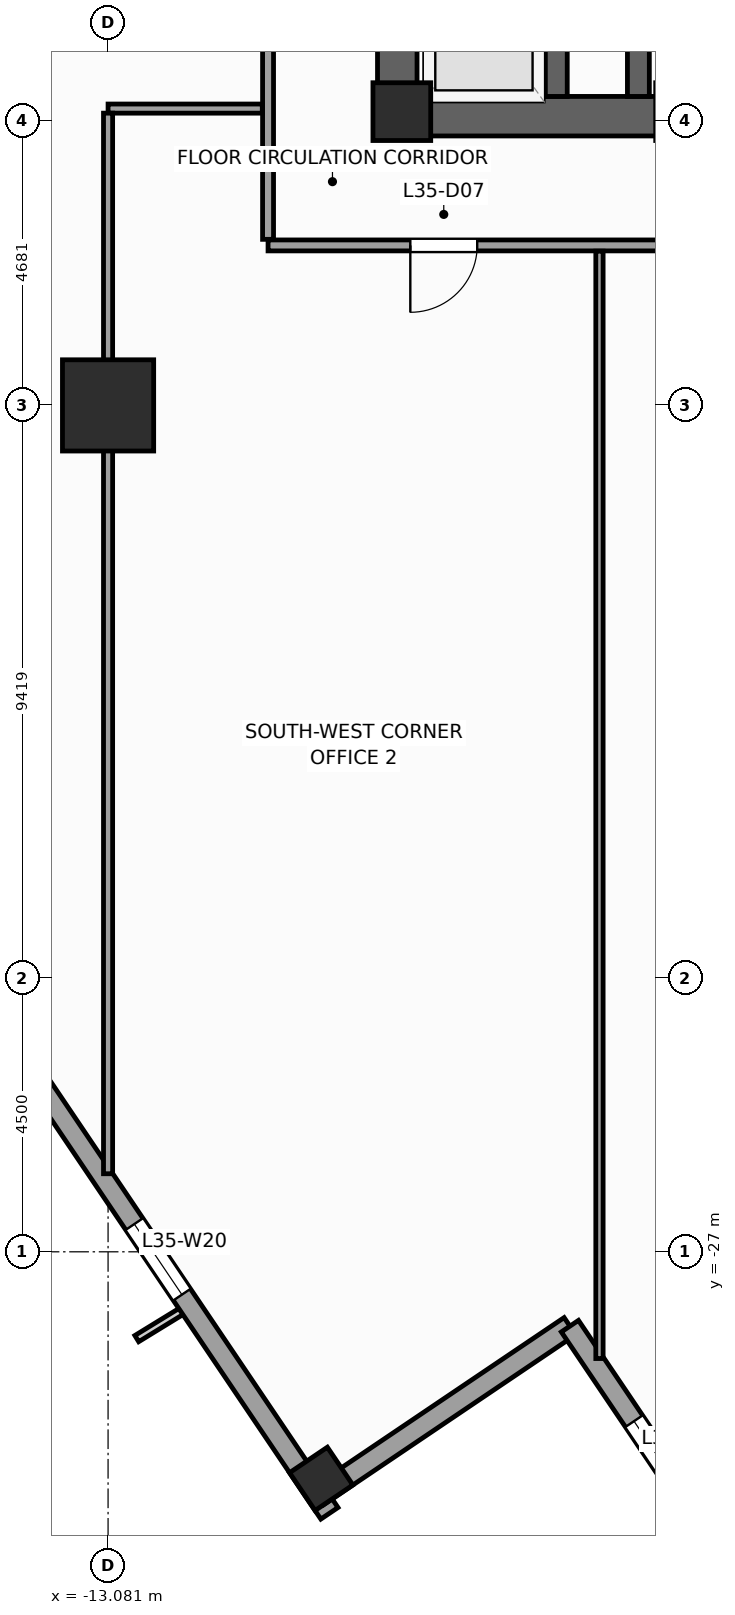
"""IFC4 building model, lengths in metres.
Left out: names, types, materials, properties, quantities, classifications, styles, units other than length and angle.
Written with IfcOpenShell. Run it as: python <this file> out.ifc"""

import sys

from ifc_helpers import new_model, si_unit, direction, frame, frame_2d, origin, origin_2d, place, context, subcontext, project, spatial, rectangle, extrude, source, transform, mapped, element, fill, save


model = new_model("IFC4")
c1 = context("Model", 3, precision=1e-05, world=origin(), true_north=direction((0.0, 1.0)))
c2 = subcontext(c1, "Body", "Model", "MODEL_VIEW")
j1 = project(units=[si_unit("LENGTHUNIT", "METRE"), si_unit("PLANEANGLEUNIT", "RADIAN")], contexts=[c1])
p1 = place(None, origin())
s1 = spatial("IfcSite", under=j1, at=p1, CompositionType="ELEMENT")
p2 = place(p1, origin())
s2 = spatial("IfcBuilding", under=s1, at=p2, CompositionType="ELEMENT")
p3 = place(p2, frame((0.0, 0.0, 148.4)))
s3 = spatial("IfcBuildingStorey", under=s2, at=p3, CompositionType="ELEMENT", Elevation=148.4)
p4 = place(p3, frame((-8.65, -8.325, 0.0), z_axis=(0.0, 0.0, 1.0), x_axis=(1.0, 0.0, 0.0)))
e1 = element("IfcWall", 1, at=p4, inside=s3, PredefinedType="SHEAR", context=c2, shape_type="SweptSolid", body=[
    extrude(rectangle(XDim=17.3, YDim=0.65, at=frame_2d((8.65, 0.0))), origin(), (0.0, 0.0, 1.0), 4.0),
])
p5 = place(p4, frame((8.0, 0.0, 0.0)))
e2 = element("IfcOpeningElement", 2, at=p5, cuts=e1, PredefinedType="OPENING", context=c2, shape_type="SweptSolid", body=[
    extrude(rectangle(XDim=1.3, YDim=2.2, at=frame_2d((0.65, 1.1))), frame((0.0, 0.335, 0.0), z_axis=(0.0, -1.0, 0.0), x_axis=(1.0, 0.0, 0.0)), (0.0, 0.0, 1.0), 0.67),
])
p6 = place(p3, frame((-8.325, -8.0, 0.0), z_axis=(0.0, 0.0, 1.0), x_axis=(0.0, 1.0, 0.0)))
e3 = element("IfcWall", 3, at=p6, inside=s3, PredefinedType="SHEAR", context=c2, shape_type="SweptSolid", body=[
    extrude(rectangle(XDim=16.0, YDim=0.65, at=frame_2d((8.0, 0.0))), origin(), (0.0, 0.0, 1.0), 4.0),
])
p7 = place(p6, frame((4.69, 0.0, 0.0)))
e4 = element("IfcOpeningElement", 4, at=p7, cuts=e3, PredefinedType="OPENING", context=c2, shape_type="SweptSolid", body=[
    extrude(rectangle(XDim=1.3, YDim=2.2, at=frame_2d((0.65, 1.1))), frame((0.0, 0.335, 0.0), z_axis=(0.0, -1.0, 0.0), x_axis=(1.0, 0.0, 0.0)), (0.0, 0.0, 1.0), 0.67),
])
p8 = place(p3, frame((-4.36, -8.0, 0.0), z_axis=(0.0, 0.0, 1.0), x_axis=(0.0, 1.0, 0.0)))
e5 = element("IfcWall", 5, at=p8, inside=s3, PredefinedType="SHEAR", context=c2, shape_type="SweptSolid", body=[
    extrude(rectangle(XDim=16.0, YDim=0.36, at=frame_2d((8.0, 0.0))), origin(), (0.0, 0.0, 1.0), 4.0),
])
p9 = place(p3, frame((-5.71, -8.0, 0.0), z_axis=(0.0, 0.0, 1.0), x_axis=(0.0, 1.0, 0.0)))
e6 = element("IfcWall", 6, at=p9, inside=s3, PredefinedType="SHEAR", context=c2, shape_type="SweptSolid", body=[
    extrude(rectangle(XDim=2.54, YDim=0.36, at=frame_2d((1.27, 0.0))), origin(), (0.0, 0.0, 1.0), 4.0),
])
m1 = source(origin(), c2, "Body", "SweptSolid", [
    extrude(rectangle(XDim=0.95, YDim=0.95, at=origin_2d()), origin(), (0.0, 0.0, 1.0), 4.0),
])
p10 = place(p3, frame((-8.25, -8.25, 0.0), z_axis=(0.0, 0.0, 1.0), x_axis=(1.0, 0.0, 0.0)))
e7 = element("IfcColumn", 7, at=p10, inside=s3, PredefinedType="PILASTER", context=c2, shape_type="MappedRepresentation", body=[
    mapped(m1, transform((0.0, 0.0, 0.0), scale=1.0)),
])
m2 = source(origin(), c2, "Body", "SweptSolid", [
    extrude(rectangle(XDim=1.5, YDim=1.5, at=origin_2d()), origin(), (0.0, 0.0, 1.0), 4.0),
])
p11 = place(p3, frame((-13.081, -13.081, 0.0), z_axis=(0.0, 0.0, 1.0), x_axis=(1.0, 0.0, 0.0)))
e8 = element("IfcColumn", 8, at=p11, inside=s3, PredefinedType="COLUMN", context=c2, shape_type="MappedRepresentation", body=[
    mapped(m2, transform((0.0, 0.0, 0.0), scale=1.0)),
])
m3 = source(origin(), c2, "Body", "SweptSolid", [
    extrude(rectangle(XDim=0.75, YDim=0.75, at=origin_2d()), origin(), (0.0, 0.0, 1.0), 4.0),
])
p12 = place(p3, frame((-9.576, -30.734, 0.0), z_axis=(0.0, 0.0, 1.0), x_axis=(0.829037572555, 0.559192903471, 0.0)))
e9 = element("IfcColumn", 9, at=p12, inside=s3, PredefinedType="COLUMN", context=c2, shape_type="MappedRepresentation", body=[
    mapped(m3, transform((0.0, 0.0, 0.0), scale=1.0)),
])
p13 = place(p3, frame((-32.558, 2.972, 0.0), z_axis=(0.0, 0.0, 1.0), x_axis=(0.559194910251, -0.829036218961, 0.0)))
e10 = element("IfcWall", 10, at=p13, inside=s3, PredefinedType="STANDARD", context=c2, shape_type="SweptSolid", body=[
    extrude(rectangle(XDim=41.34, YDim=0.34, at=frame_2d((20.67, 0.0))), origin(), (0.0, 0.0, 1.0), 3.04),
])
p14 = place(p13, frame((3.511, 0.0, 0.56)))
e11 = element("IfcOpeningElement", 11, at=p14, cuts=e10, PredefinedType="OPENING", context=c2, shape_type="SweptSolid", body=[
    extrude(rectangle(XDim=1.4, YDim=2.4, at=frame_2d((0.7, 1.2))), frame((0.0, 0.18, 0.0), z_axis=(0.0, -1.0, 0.0), x_axis=(1.0, 0.0, 0.0)), (0.0, 0.0, 1.0), 0.36),
])
p15 = place(p13, frame((11.064, 0.0, 0.61)))
e12 = element("IfcOpeningElement", 12, at=p15, cuts=e10, PredefinedType="OPENING", context=c2, shape_type="SweptSolid", body=[
    extrude(rectangle(XDim=1.85, YDim=2.35, at=frame_2d((0.925, 1.175))), frame((0.0, 0.18, 0.0), z_axis=(0.0, -1.0, 0.0), x_axis=(1.0, 0.0, 0.0)), (0.0, 0.0, 1.0), 0.36),
])
p16 = place(p13, frame((18.168, 0.0, 0.61)))
e13 = element("IfcOpeningElement", 13, at=p16, cuts=e10, PredefinedType="OPENING", context=c2, shape_type="SweptSolid", body=[
    extrude(rectangle(XDim=1.85, YDim=2.35, at=frame_2d((0.925, 1.175))), frame((0.0, 0.18, 0.0), z_axis=(0.0, -1.0, 0.0), x_axis=(1.0, 0.0, 0.0)), (0.0, 0.0, 1.0), 0.36),
])
p17 = place(p13, frame((27.186, 0.0, 0.61)))
e14 = element("IfcOpeningElement", 14, at=p17, cuts=e10, PredefinedType="OPENING", context=c2, shape_type="SweptSolid", body=[
    extrude(rectangle(XDim=1.85, YDim=2.35, at=frame_2d((0.925, 1.175))), frame((0.0, 0.18, 0.0), z_axis=(0.0, -1.0, 0.0), x_axis=(1.0, 0.0, 0.0)), (0.0, 0.0, 1.0), 0.36),
])
p18 = place(p13, frame((35.602, 0.0, 0.56)))
e15 = element("IfcOpeningElement", 15, at=p18, cuts=e10, PredefinedType="OPENING", context=c2, shape_type="SweptSolid", body=[
    extrude(rectangle(XDim=1.4, YDim=2.4, at=frame_2d((0.7, 1.2))), frame((0.0, 0.18, 0.0), z_axis=(0.0, -1.0, 0.0), x_axis=(1.0, 0.0, 0.0)), (0.0, 0.0, 1.0), 0.36),
])
p19 = place(p3, frame((-9.631, -31.019, 0.0), z_axis=(0.0, 0.0, 1.0), x_axis=(0.829025804298, 0.559210350234, 0.0)))
e16 = element("IfcWall", 16, at=p19, inside=s3, PredefinedType="STANDARD", context=c2, shape_type="SweptSolid", body=[
    extrude(rectangle(XDim=5.0, YDim=0.34, at=frame_2d((2.5, 0.0))), origin(), (0.0, 0.0, 1.0), 3.74),
])
p20 = place(p3, frame((-5.486, -28.223, 0.0), z_axis=(0.0, 0.0, 1.0), x_axis=(0.559171107879, -0.82905227345, 0.0)))
e17 = element("IfcWall", 17, at=p20, inside=s3, PredefinedType="STANDARD", context=c2, shape_type="SweptSolid", body=[
    extrude(rectangle(XDim=5.17, YDim=0.34, at=frame_2d((2.585, 0.0))), origin(), (0.0, 0.0, 1.0), 3.04),
])
p21 = place(p20, frame((1.885, 0.0, 0.56)))
e18 = element("IfcOpeningElement", 18, at=p21, cuts=e17, PredefinedType="OPENING", context=c2, shape_type="SweptSolid", body=[
    extrude(rectangle(XDim=1.4, YDim=2.4, at=frame_2d((0.7, 1.2))), frame((0.0, 0.18, 0.0), z_axis=(0.0, -1.0, 0.0), x_axis=(1.0, 0.0, 0.0)), (0.0, 0.0, 1.0), 0.36),
])
p22 = place(p3, frame((-10.45, -10.45, 0.0), z_axis=(0.0, 0.0, 1.0), x_axis=(1.0, 0.0, 0.0)))
e19 = element("IfcWall", 19, at=p22, inside=s3, PredefinedType="PARTITIONING", context=c2, shape_type="SweptSolid", body=[
    extrude(rectangle(XDim=20.9, YDim=0.18, at=frame_2d((10.45, 0.0))), origin(), (0.0, 0.0, 1.0), 3.74),
])
p23 = place(p22, frame((2.339, 0.0, 0.0)))
e20 = element("IfcOpeningElement", 20, at=p23, cuts=e19, PredefinedType="OPENING", context=c2, shape_type="SweptSolid", body=[
    extrude(rectangle(XDim=1.1, YDim=2.2, at=frame_2d((0.55, 1.1))), frame((0.0, 0.1, 0.0), z_axis=(0.0, -1.0, 0.0), x_axis=(1.0, 0.0, 0.0)), (0.0, 0.0, 1.0), 0.2),
])
p24 = place(p22, frame((7.4, 0.0, 0.0)))
e21 = element("IfcOpeningElement", 21, at=p24, cuts=e19, PredefinedType="OPENING", context=c2, shape_type="SweptSolid", body=[
    extrude(rectangle(XDim=1.1, YDim=2.2, at=frame_2d((0.55, 1.1))), frame((0.0, 0.1, 0.0), z_axis=(0.0, -1.0, 0.0), x_axis=(1.0, 0.0, 0.0)), (0.0, 0.0, 1.0), 0.2),
])
p25 = place(p22, frame((12.4, 0.0, 0.0)))
e22 = element("IfcOpeningElement", 22, at=p25, cuts=e19, PredefinedType="OPENING", context=c2, shape_type="SweptSolid", body=[
    extrude(rectangle(XDim=1.1, YDim=2.2, at=frame_2d((0.55, 1.1))), frame((0.0, 0.1, 0.0), z_axis=(0.0, -1.0, 0.0), x_axis=(1.0, 0.0, 0.0)), (0.0, 0.0, 1.0), 0.2),
])
p26 = place(p22, frame((17.46, 0.0, 0.0)))
e23 = element("IfcOpeningElement", 23, at=p26, cuts=e19, PredefinedType="OPENING", context=c2, shape_type="SweptSolid", body=[
    extrude(rectangle(XDim=1.1, YDim=2.2, at=frame_2d((0.55, 1.1))), frame((0.0, 0.1, 0.0), z_axis=(0.0, -1.0, 0.0), x_axis=(1.0, 0.0, 0.0)), (0.0, 0.0, 1.0), 0.2),
])
p27 = place(p3, frame((-10.45, -10.35, 0.0), z_axis=(0.0, 0.0, 1.0), x_axis=(0.0, 1.0, 0.0)))
e24 = element("IfcWall", 24, at=p27, inside=s3, PredefinedType="PARTITIONING", context=c2, shape_type="SweptSolid", body=[
    extrude(rectangle(XDim=8.95, YDim=0.18, at=frame_2d((4.475, 0.0))), origin(), (0.0, 0.0, 1.0), 3.74),
])
p28 = place(p27, frame((6.436, 0.0, 0.0)))
e25 = element("IfcOpeningElement", 25, at=p28, cuts=e24, PredefinedType="OPENING", context=c2, shape_type="SweptSolid", body=[
    extrude(rectangle(XDim=1.1, YDim=2.2, at=frame_2d((0.55, 1.1))), frame((0.0, 0.1, 0.0), z_axis=(0.0, -1.0, 0.0), x_axis=(1.0, 0.0, 0.0)), (0.0, 0.0, 1.0), 0.2),
])
p29 = place(p27, frame((3.2, 0.0, 0.0)))
e26 = element("IfcOpeningElement", 26, at=p29, cuts=e24, PredefinedType="OPENING", context=c2, shape_type="SweptSolid", body=[
    extrude(rectangle(XDim=1.1, YDim=2.2, at=frame_2d((0.55, 1.1))), frame((0.0, 0.1, 0.0), z_axis=(0.0, -1.0, 0.0), x_axis=(1.0, 0.0, 0.0)), (0.0, 0.0, 1.0), 0.2),
])
p30 = place(p3, frame((-10.545, -8.2, 0.0), z_axis=(0.0, 0.0, 1.0), x_axis=(-1.0, 0.0, 0.0)))
e27 = element("IfcWall", 27, at=p30, inside=s3, PredefinedType="PARTITIONING", context=c2, shape_type="SweptSolid", body=[
    extrude(rectangle(XDim=2.536, YDim=0.15, at=frame_2d((1.268, 0.0))), origin(), (0.0, 0.0, 1.0), 3.74),
])
p31 = place(p3, frame((-13.081, -8.275, 0.0), z_axis=(0.0, 0.0, 1.0), x_axis=(0.0, -1.0, 0.0)))
e28 = element("IfcWall", 28, at=p31, inside=s3, PredefinedType="PARTITIONING", context=c2, shape_type="SweptSolid", body=[
    extrude(rectangle(XDim=17.441, YDim=0.15, at=frame_2d((8.721, 0.0))), origin(), (0.0, 0.0, 1.0), 2.84),
])
p32 = place(p3, frame((-5.0, -28.755, 0.0), z_axis=(0.0, 0.0, 1.0), x_axis=(0.0, 1.0, 0.0)))
e29 = element("IfcWall", 29, at=p32, inside=s3, PredefinedType="PARTITIONING", context=c2, shape_type="SweptSolid", body=[
    extrude(rectangle(XDim=18.21, YDim=0.12, at=frame_2d((9.105, 0.0))), origin(), (0.0, 0.0, 1.0), 3.74),
])
m4 = source(origin(), c2, "Body", "SweptSolid", [
    extrude(rectangle(XDim=1.4, YDim=2.4, at=frame_2d((0.7, 1.2))), frame((0.0, 0.03, 0.0), z_axis=(0.0, -1.0, 0.0), x_axis=(1.0, 0.0, 0.0)), (0.0, 0.0, 1.0), 0.06),
])
p33 = place(p18, origin())
e30 = element("IfcWindow", 30, at=p33, inside=s3, PartitioningType="SINGLE_PANEL", PredefinedType="WINDOW", context=c2, shape_type="MappedRepresentation", body=[
    mapped(m4, transform((0.0, 0.0, 0.0), scale=1.0)),
])
fill(e15, e30)
p34 = place(p21, origin())
e31 = element("IfcWindow", 31, at=p34, inside=s3, PartitioningType="SINGLE_PANEL", PredefinedType="WINDOW", context=c2, shape_type="MappedRepresentation", body=[
    mapped(m4, transform((0.0, 0.0, 0.0), scale=1.0)),
])
fill(e18, e31)
m5 = source(origin(), c2, "Body", "SweptSolid", [
    extrude(rectangle(XDim=1.1, YDim=2.2, at=frame_2d((0.55, 1.1))), frame((0.0, 0.025, 0.0), z_axis=(0.0, -1.0, 0.0), x_axis=(1.0, 0.0, 0.0)), (0.0, 0.0, 1.0), 0.05),
])
p35 = place(p23, frame((1.1, 0.0, 0.0), z_axis=(0.0, 0.0, 1.0), x_axis=(-1.0, 0.0, 0.0)))
e32 = element("IfcDoor", 32, at=p35, inside=s3, OperationType="SINGLE_SWING_LEFT", PredefinedType="DOOR", context=c2, shape_type="MappedRepresentation", body=[
    mapped(m5, transform((0.0, 0.0, 0.0), scale=1.0)),
])
fill(e20, e32)
save(model, sys.argv[1])
